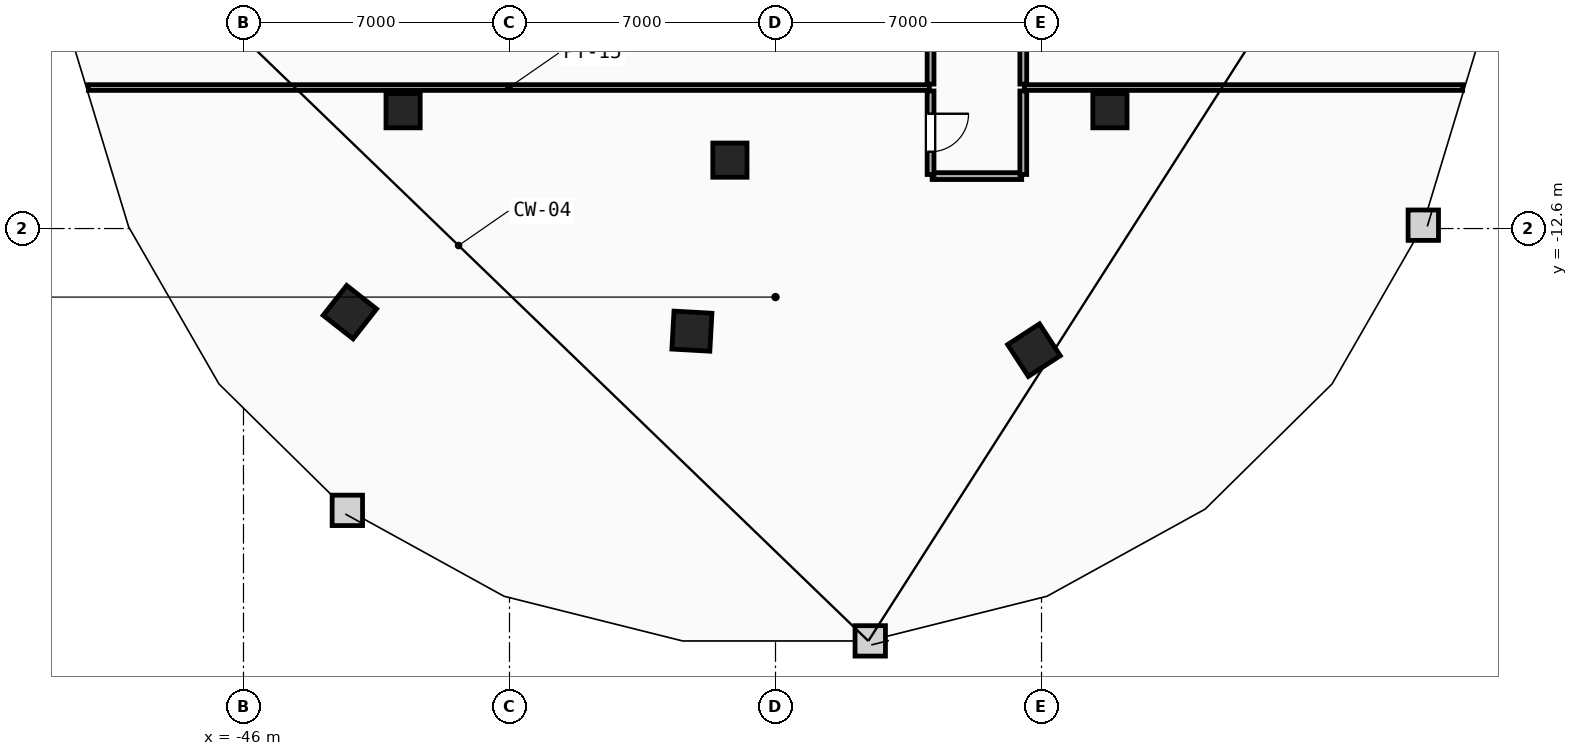
"""IFC4 building model, lengths in metres.
Left out: names, types, materials, properties, quantities, classifications, styles, units other than length and angle.
Written with IfcOpenShell. Run it as: python <this file> out.ifc"""

import sys

from ifc_helpers import new_model, si_unit, direction, frame, frame_2d, origin, origin_2d, place, context, subcontext, project, spatial, rectangle, extrude, element, fill, save


model = new_model("IFC4")
c1 = context("Model", 3, precision=1e-05, world=origin(), true_north=direction((0.0, 1.0)))
c2 = subcontext(c1, "Body", "Model", "MODEL_VIEW")
j1 = project(units=[si_unit("LENGTHUNIT", "METRE"), si_unit("PLANEANGLEUNIT", "RADIAN")], contexts=[c1])
p1 = place(None, origin())
s1 = spatial("IfcSite", under=j1, at=p1, CompositionType="ELEMENT")
p2 = place(p1, origin())
s2 = spatial("IfcBuilding", under=s1, at=p2, CompositionType="ELEMENT")
p3 = place(p2, frame((0.0, 0.0, 165.6)))
s3 = spatial("IfcBuildingStorey", under=s2, at=p3, CompositionType="ELEMENT", Elevation=165.6)
for number, where, z_axis, x_axis in (
    (1, (-41.8, -9.5, 0.0), (0.0, 0.0, 1.0), (1.0, 0.0, 0.0)),
    (2, (-33.2, -10.8, 0.0), (0.0, 0.0, 1.0), (1.0, 0.0, 0.0)),
    (3, (-23.2, -9.5, 0.0), (0.0, 0.0, 1.0), (1.0, 0.0, 0.0)),
):
    element("IfcColumn", number, at=place(p3, frame(where, z_axis=z_axis, x_axis=x_axis)), inside=s3, PredefinedType="COLUMN", context=c2, shape_type="SweptSolid", body=[
        extrude(rectangle(XDim=0.9, YDim=0.9, at=origin_2d()), origin(), (0.0, 0.0, 1.0), 3.6),
    ])
for number, where, z_axis, x_axis in (
    (4, (-43.2, -14.8, 0.0), (0.0, 0.0, 1.0), (0.786, -0.618, 0.0)),
    (5, (-34.2, -15.3, 0.0), (0.0, 0.0, 1.0), (0.998, -0.055, 0.0)),
    (6, (-25.2, -15.8, 0.0), (0.0, 0.0, 1.0), (0.838, 0.546, 0.0)),
):
    element("IfcColumn", number, at=place(p3, frame(where, z_axis=z_axis, x_axis=x_axis)), inside=s3, PredefinedType="COLUMN", context=c2, shape_type="SweptSolid", body=[
        extrude(rectangle(XDim=1.0, YDim=1.0, at=origin_2d()), origin(), (0.0, 0.0, 1.0), 3.6),
    ])
p4 = place(p3, frame((-50.082, -8.89, 0.0), z_axis=(0.0, 0.0, 1.0), x_axis=(1.0, 0.0, 0.0)))
e7 = element("IfcWall", 7, at=p4, inside=s3, PredefinedType="PARTITIONING", context=c2, shape_type="SweptSolid", body=[
    extrude(rectangle(XDim=22.132, YDim=0.15, at=frame_2d((11.066, 0.0))), origin(), (0.0, 0.0, 1.0), 3.36),
])
p5 = place(p3, frame((-25.45, -8.89, 0.0), z_axis=(0.0, 0.0, 1.0), x_axis=(1.0, 0.0, 0.0)))
e8 = element("IfcWall", 8, at=p5, inside=s3, PredefinedType="PARTITIONING", context=c2, shape_type="SweptSolid", body=[
    extrude(rectangle(XDim=11.532, YDim=0.15, at=frame_2d((5.766, 0.0))), origin(), (0.0, 0.0, 1.0), 3.36),
])
p6 = place(p3, frame((-27.878, -11.22, 0.0), z_axis=(0.0, 0.0, 1.0), x_axis=(1.0, 0.0, 0.0)))
e9 = element("IfcWall", 9, at=p6, inside=s3, PredefinedType="PARTITIONING", context=c2, shape_type="SweptSolid", body=[
    extrude(rectangle(XDim=2.357, YDim=0.18, at=frame_2d((1.178, 0.0))), origin(), (0.0, 0.0, 1.0), 3.36),
])
p7 = place(p3, frame((-27.92, -8.98, 0.0), z_axis=(0.0, 0.0, 1.0), x_axis=(0.0, -1.0, 0.0)))
e10 = element("IfcWall", 10, at=p7, inside=s3, PredefinedType="PARTITIONING", context=c2, shape_type="SweptSolid", body=[
    extrude(rectangle(XDim=2.198, YDim=0.18, at=frame_2d((1.099, 0.0))), origin(), (0.0, 0.0, 1.0), 3.36),
])
p8 = place(p7, frame((0.599, 0.0, 0.0)))
e11 = element("IfcOpeningElement", 11, at=p8, cuts=e10, PredefinedType="OPENING", context=c2, shape_type="SweptSolid", body=[
    extrude(rectangle(XDim=1.0, YDim=2.15, at=frame_2d((0.5, 1.075))), frame((0.0, 0.1, 0.0), z_axis=(0.0, -1.0, 0.0), x_axis=(1.0, 0.0, 0.0)), (0.0, 0.0, 1.0), 0.2),
])
p9 = place(p3, frame((-25.48, -11.178, 0.0), z_axis=(0.0, 0.0, 1.0), x_axis=(0.0, 1.0, 0.0)))
e12 = element("IfcWall", 12, at=p9, inside=s3, PredefinedType="PARTITIONING", context=c2, shape_type="SweptSolid", body=[
    extrude(rectangle(XDim=2.198, YDim=0.18, at=frame_2d((1.099, 0.0))), origin(), (0.0, 0.0, 1.0), 3.36),
])
p10 = place(p3, frame((-27.92, -0.45, 0.0), z_axis=(0.0, 0.0, 1.0), x_axis=(0.0, -1.0, 0.0)))
e13 = element("IfcWall", 13, at=p10, inside=s3, PredefinedType="PARTITIONING", context=c2, shape_type="SweptSolid", body=[
    extrude(rectangle(XDim=8.35, YDim=0.18, at=frame_2d((4.175, 0.0))), origin(), (0.0, 0.0, 1.0), 3.36),
])
p11 = place(p10, frame((3.675, 0.0, 0.0)))
e14 = element("IfcOpeningElement", 14, at=p11, cuts=e13, PredefinedType="OPENING", context=c2, shape_type="SweptSolid", body=[
    extrude(rectangle(XDim=1.0, YDim=2.15, at=frame_2d((0.5, 1.075))), frame((0.0, 0.1, 0.0), z_axis=(0.0, -1.0, 0.0), x_axis=(1.0, 0.0, 0.0)), (0.0, 0.0, 1.0), 0.2),
])
p12 = place(p3, frame((-25.48, -8.8, 0.0), z_axis=(0.0, 0.0, 1.0), x_axis=(0.0, 1.0, 0.0)))
e15 = element("IfcWall", 15, at=p12, inside=s3, PredefinedType="PARTITIONING", context=c2, shape_type="SweptSolid", body=[
    extrude(rectangle(XDim=8.35, YDim=0.18, at=frame_2d((4.175, 0.0))), origin(), (0.0, 0.0, 1.0), 3.36),
])
p13 = place(p8, origin())
e16 = element("IfcDoor", 16, at=p13, inside=s3, OperationType="SINGLE_SWING_LEFT", PredefinedType="DOOR", context=c2, shape_type="SweptSolid", body=[
    extrude(rectangle(XDim=1.0, YDim=2.15, at=frame_2d((0.5, 1.075))), frame((0.0, 0.025, 0.0), z_axis=(0.0, -1.0, 0.0), x_axis=(1.0, 0.0, 0.0)), (0.0, 0.0, 1.0), 0.05),
])
fill(e11, e16)
save(model, sys.argv[1])
